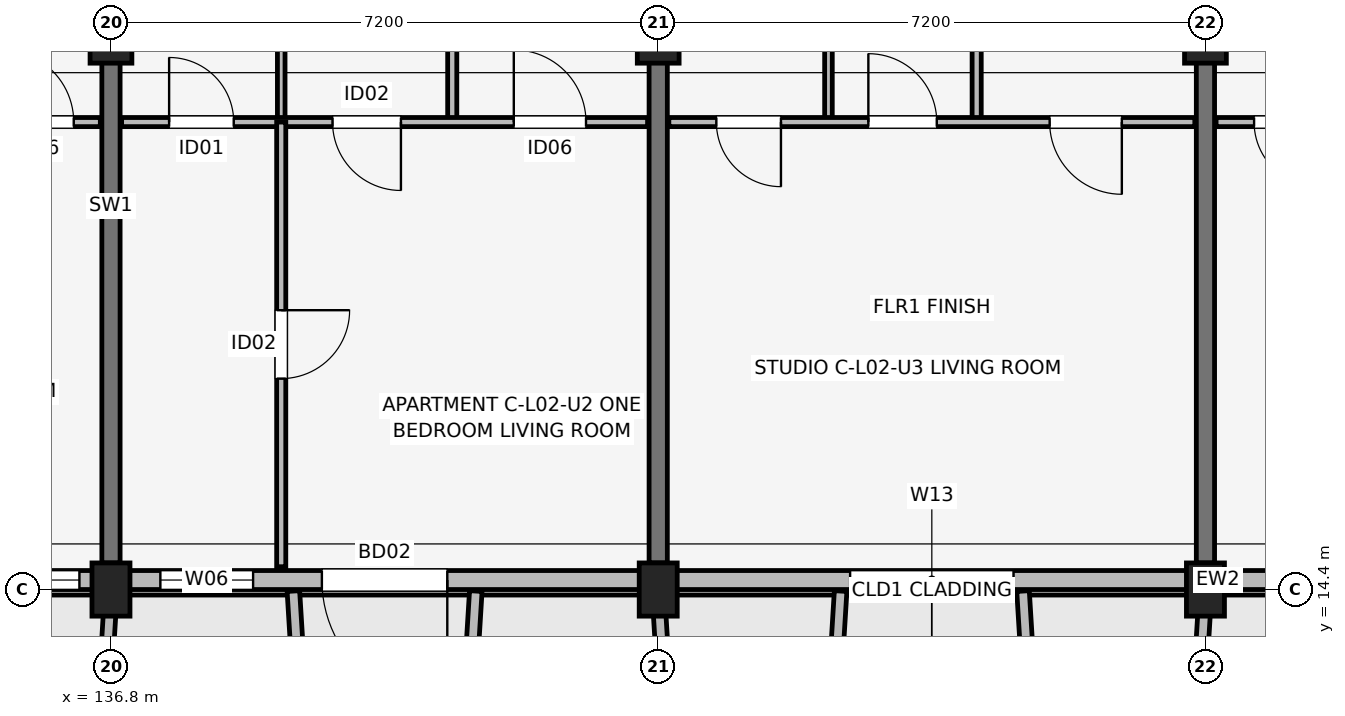
"""IFC4 building model, lengths in metres.
Left out: names, types, materials, properties, quantities, classifications, styles, units other than length and angle.
Written with IfcOpenShell. Run it as: python <this file> out.ifc"""

import sys

from ifc_helpers import new_model, si_unit, direction, frame, frame_2d, origin, origin_2d, place, context, subcontext, project, spatial, rectangle, extrude, element, fill, save


model = new_model("IFC4")
c1 = context("Model", 3, precision=1e-05, world=origin(), true_north=direction((0.0, 1.0)))
c2 = subcontext(c1, "Body", "Model", "MODEL_VIEW")
j1 = project(units=[si_unit("LENGTHUNIT", "METRE"), si_unit("PLANEANGLEUNIT", "RADIAN")], contexts=[c1])
p1 = place(None, origin())
s1 = spatial("IfcSite", under=j1, at=p1, CompositionType="ELEMENT")
p2 = place(p1, origin())
s2 = spatial("IfcBuilding", under=s1, at=p2, CompositionType="ELEMENT")
p3 = place(p2, frame((0.0, 0.0, 8.7)))
s3 = spatial("IfcBuildingStorey", under=s2, at=p3, CompositionType="ELEMENT", Elevation=8.7)
p4 = place(p3, frame((136.8, 14.4, 0.0), z_axis=(0.0, 0.0, 1.0), x_axis=(1.0, 0.0, 0.0)))
e1 = element("IfcColumn", 1, at=p4, inside=s3, PredefinedType="COLUMN", context=c2, shape_type="SweptSolid", body=[
    extrude(rectangle(XDim=0.5, YDim=0.7, at=origin_2d()), origin(), (0.0, 0.0, 1.0), 3.15),
])
p5 = place(p3, frame((136.8, 21.6, 0.0), z_axis=(0.0, 0.0, 1.0), x_axis=(1.0, 0.0, 0.0)))
e2 = element("IfcColumn", 2, at=p5, inside=s3, PredefinedType="COLUMN", context=c2, shape_type="SweptSolid", body=[
    extrude(rectangle(XDim=0.55, YDim=0.55, at=origin_2d()), origin(), (0.0, 0.0, 1.0), 3.15),
])
p6 = place(p3, frame((144.0, 14.4, 0.0), z_axis=(0.0, 0.0, 1.0), x_axis=(1.0, 0.0, 0.0)))
e3 = element("IfcColumn", 3, at=p6, inside=s3, PredefinedType="COLUMN", context=c2, shape_type="SweptSolid", body=[
    extrude(rectangle(XDim=0.5, YDim=0.7, at=origin_2d()), origin(), (0.0, 0.0, 1.0), 3.15),
])
p7 = place(p3, frame((144.0, 21.6, 0.0), z_axis=(0.0, 0.0, 1.0), x_axis=(1.0, 0.0, 0.0)))
e4 = element("IfcColumn", 4, at=p7, inside=s3, PredefinedType="COLUMN", context=c2, shape_type="SweptSolid", body=[
    extrude(rectangle(XDim=0.55, YDim=0.55, at=origin_2d()), origin(), (0.0, 0.0, 1.0), 3.15),
])
p8 = place(p3, frame((151.2, 14.4, 0.0), z_axis=(0.0, 0.0, 1.0), x_axis=(1.0, 0.0, 0.0)))
e5 = element("IfcColumn", 5, at=p8, inside=s3, PredefinedType="COLUMN", context=c2, shape_type="SweptSolid", body=[
    extrude(rectangle(XDim=0.5, YDim=0.7, at=origin_2d()), origin(), (0.0, 0.0, 1.0), 3.15),
])
p9 = place(p3, frame((151.2, 21.6, 0.0), z_axis=(0.0, 0.0, 1.0), x_axis=(1.0, 0.0, 0.0)))
e6 = element("IfcColumn", 6, at=p9, inside=s3, PredefinedType="COLUMN", context=c2, shape_type="SweptSolid", body=[
    extrude(rectangle(XDim=0.55, YDim=0.55, at=origin_2d()), origin(), (0.0, 0.0, 1.0), 3.15),
])
for number, where, z_axis, x_axis in (
    (7, (136.8, 14.75, 0.0), (0.0, 0.0, 1.0), (0.0, 1.0, 0.0)),
    (8, (144.0, 14.75, 0.0), (0.0, 0.0, 1.0), (0.0, 1.0, 0.0)),
    (9, (151.2, 14.75, 0.0), (0.0, 0.0, 1.0), (0.0, 1.0, 0.0)),
):
    element("IfcWall", number, at=place(p3, frame(where, z_axis=z_axis, x_axis=x_axis)), inside=s3, PredefinedType="SHEAR", context=c2, shape_type="SweptSolid", body=[
        extrude(rectangle(XDim=9.4, YDim=0.24, at=frame_2d((4.7, 0.0))), origin(), (0.0, 0.0, 1.0), 3.15),
    ])
p10 = place(p3, frame((132.6, 14.525, 0.0), z_axis=(0.0, 0.0, 1.0), x_axis=(1.0, 0.0, 0.0)))
e10 = element("IfcWall", 10, at=p10, inside=s3, PredefinedType="SOLIDWALL", context=c2, shape_type="SweptSolid", body=[
    extrude(rectangle(XDim=30.0, YDim=0.25, at=frame_2d((15.0, 0.0))), origin(), (0.0, 0.0, 1.0), 2.43),
])
p11 = place(p10, frame((8.625, 0.0, 0.0), z_axis=(0.0, 0.0, 1.0), x_axis=(-1.0, 0.0, 0.0)))
e11 = element("IfcOpeningElement", 11, at=p11, cuts=e10, PredefinedType="OPENING", context=c2, shape_type="SweptSolid", body=[
    extrude(rectangle(XDim=1.65, YDim=2.15, at=frame_2d((0.825, 1.075))), frame((0.0, 0.135, 0.0), z_axis=(0.0, -1.0, 0.0), x_axis=(1.0, 0.0, 0.0)), (0.0, 0.0, 1.0), 0.27),
])
p12 = place(p10, frame((22.95, 0.0, 0.0), z_axis=(0.0, 0.0, 1.0), x_axis=(-1.0, 0.0, 0.0)))
e12 = element("IfcOpeningElement", 12, at=p12, cuts=e10, PredefinedType="OPENING", context=c2, shape_type="SweptSolid", body=[
    extrude(rectangle(XDim=1.5, YDim=2.15, at=frame_2d((0.75, 1.075))), frame((0.0, 0.135, 0.0), z_axis=(0.0, -1.0, 0.0), x_axis=(1.0, 0.0, 0.0)), (0.0, 0.0, 1.0), 0.27),
])
p13 = place(p10, frame((1.925, 0.0, 0.7)))
e13 = element("IfcOpeningElement", 13, at=p13, cuts=e10, PredefinedType="OPENING", context=c2, shape_type="SweptSolid", body=[
    extrude(rectangle(XDim=1.86, YDim=1.6, at=frame_2d((0.93, 0.8))), frame((0.0, 0.135, 0.0), z_axis=(0.0, -1.0, 0.0), x_axis=(1.0, 0.0, 0.0)), (0.0, 0.0, 1.0), 0.27),
])
p14 = place(p10, frame((4.85, 0.0, 0.75)))
e14 = element("IfcOpeningElement", 14, at=p14, cuts=e10, PredefinedType="OPENING", context=c2, shape_type="SweptSolid", body=[
    extrude(rectangle(XDim=1.22, YDim=1.5, at=frame_2d((0.61, 0.75))), frame((0.0, 0.135, 0.0), z_axis=(0.0, -1.0, 0.0), x_axis=(1.0, 0.0, 0.0)), (0.0, 0.0, 1.0), 0.27),
])
p15 = place(p10, frame((13.925, 0.0, 0.67)))
e15 = element("IfcOpeningElement", 15, at=p15, cuts=e10, PredefinedType="OPENING", context=c2, shape_type="SweptSolid", body=[
    extrude(rectangle(XDim=2.15, YDim=1.65, at=frame_2d((1.075, 0.825))), frame((0.0, 0.135, 0.0), z_axis=(0.0, -1.0, 0.0), x_axis=(1.0, 0.0, 0.0)), (0.0, 0.0, 1.0), 0.27),
])
p16 = place(p10, frame((26.265, 0.0, 0.75)))
e16 = element("IfcOpeningElement", 16, at=p16, cuts=e10, PredefinedType="OPENING", context=c2, shape_type="SweptSolid", body=[
    extrude(rectangle(XDim=1.34, YDim=1.55, at=frame_2d((0.67, 0.775))), frame((0.0, 0.135, 0.0), z_axis=(0.0, -1.0, 0.0), x_axis=(1.0, 0.0, 0.0)), (0.0, 0.0, 1.0), 0.27),
])
p17 = place(p10, frame((28.715, 0.0, 0.75)))
e17 = element("IfcOpeningElement", 17, at=p17, cuts=e10, PredefinedType="OPENING", context=c2, shape_type="SweptSolid", body=[
    extrude(rectangle(XDim=0.6, YDim=1.25, at=frame_2d((0.3, 0.625))), frame((0.0, 0.135, 0.0), z_axis=(0.0, -1.0, 0.0), x_axis=(1.0, 0.0, 0.0)), (0.0, 0.0, 1.0), 0.27),
])
p18 = place(p3, frame((136.8, 14.38, 0.0), z_axis=(0.0, 0.0, 1.0), x_axis=(-0.061170732449, -0.998127317276, 0.0)))
e18 = element("IfcWall", 18, at=p18, inside=s3, PredefinedType="ELEMENTEDWALL", context=c2, shape_type="SweptSolid", body=[
    extrude(rectangle(XDim=1.964, YDim=0.165, at=frame_2d((0.982, 0.0))), origin(), (0.0, 0.0, 1.0), 2.95),
])
for number, where, z_axis, x_axis in (
    (19, (139.2, 14.38, 0.0), (0.0, 0.0, 1.0), (0.061, -0.998, 0.0)),
    (20, (141.6, 14.38, 0.0), (0.0, 0.0, 1.0), (-0.061, -0.998, 0.0)),
):
    element("IfcWall", number, at=place(p3, frame(where, z_axis=z_axis, x_axis=x_axis)), inside=s3, PredefinedType="ELEMENTEDWALL", context=c2, shape_type="SweptSolid", body=[
        extrude(rectangle(XDim=1.964, YDim=0.165, at=frame_2d((0.982, 0.0))), origin(), (0.0, 0.0, 1.0), 2.53),
    ])
p19 = place(p3, frame((144.0, 14.38, 0.0), z_axis=(0.0, 0.0, 1.0), x_axis=(0.061170732449, -0.998127317276, 0.0)))
e21 = element("IfcWall", 21, at=p19, inside=s3, PredefinedType="ELEMENTEDWALL", context=c2, shape_type="SweptSolid", body=[
    extrude(rectangle(XDim=1.964, YDim=0.165, at=frame_2d((0.982, 0.0))), origin(), (0.0, 0.0, 1.0), 2.95),
])
for number, where, z_axis, x_axis in (
    (22, (146.4, 14.38, 0.0), (0.0, 0.0, 1.0), (-0.061, -0.998, 0.0)),
    (23, (148.8, 14.38, 0.0), (0.0, 0.0, 1.0), (0.061, -0.998, 0.0)),
):
    element("IfcWall", number, at=place(p3, frame(where, z_axis=z_axis, x_axis=x_axis)), inside=s3, PredefinedType="ELEMENTEDWALL", context=c2, shape_type="SweptSolid", body=[
        extrude(rectangle(XDim=1.964, YDim=0.165, at=frame_2d((0.982, 0.0))), origin(), (0.0, 0.0, 1.0), 2.53),
    ])
p20 = place(p3, frame((151.2, 14.38, 0.0), z_axis=(0.0, 0.0, 1.0), x_axis=(-0.061046865508, -0.998134900808, 0.0)))
e24 = element("IfcWall", 24, at=p20, inside=s3, PredefinedType="ELEMENTEDWALL", context=c2, shape_type="SweptSolid", body=[
    extrude(rectangle(XDim=1.964, YDim=0.165, at=frame_2d((0.982, 0.0))), origin(), (0.0, 0.0, 1.0), 2.95),
])
p21 = place(p3, frame((129.74, 20.55, 0.0), z_axis=(0.0, 0.0, 1.0), x_axis=(1.0, 0.0, 0.0)))
e25 = element("IfcWall", 25, at=p21, inside=s3, PredefinedType="PARTITIONING", context=c2, shape_type="SweptSolid", body=[
    extrude(rectangle(XDim=6.92, YDim=0.12, at=frame_2d((3.46, 0.0))), origin(), (0.0, 0.0, 1.0), 2.38),
])
p22 = place(p21, frame((2.24, 0.0, 0.0)))
e26 = element("IfcOpeningElement", 26, at=p22, cuts=e25, PredefinedType="OPENING", context=c2, shape_type="SweptSolid", body=[
    extrude(rectangle(XDim=0.85, YDim=2.08, at=frame_2d((0.425, 1.04))), frame((0.0, 0.07, 0.0), z_axis=(0.0, -1.0, 0.0), x_axis=(1.0, 0.0, 0.0)), (0.0, 0.0, 1.0), 0.14),
])
p23 = place(p21, frame((4.895, 0.0, 0.0), z_axis=(0.0, 0.0, 1.0), x_axis=(-1.0, 0.0, 0.0)))
e27 = element("IfcOpeningElement", 27, at=p23, cuts=e25, PredefinedType="OPENING", context=c2, shape_type="SweptSolid", body=[
    extrude(rectangle(XDim=0.9, YDim=2.08, at=frame_2d((0.45, 1.04))), frame((0.0, 0.07, 0.0), z_axis=(0.0, -1.0, 0.0), x_axis=(1.0, 0.0, 0.0)), (0.0, 0.0, 1.0), 0.14),
])
p24 = place(p21, frame((5.62, 0.0, 0.0)))
e28 = element("IfcOpeningElement", 28, at=p24, cuts=e25, PredefinedType="OPENING", context=c2, shape_type="SweptSolid", body=[
    extrude(rectangle(XDim=0.95, YDim=2.08, at=frame_2d((0.475, 1.04))), frame((0.0, 0.07, 0.0), z_axis=(0.0, -1.0, 0.0), x_axis=(1.0, 0.0, 0.0)), (0.0, 0.0, 1.0), 0.14),
])
p25 = place(p3, frame((139.04, 20.55, 0.0), z_axis=(0.0, 0.0, 1.0), x_axis=(0.0, 1.0, 0.0)))
e29 = element("IfcWall", 29, at=p25, inside=s3, PredefinedType="PARTITIONING", context=c2, shape_type="SweptSolid", body=[
    extrude(rectangle(XDim=3.75, YDim=0.1, at=frame_2d((1.875, 0.0))), origin(), (0.0, 0.0, 1.0), 2.375),
])
p26 = place(p3, frame((141.29, 20.55, 0.0), z_axis=(0.0, 0.0, 1.0), x_axis=(0.0, 1.0, 0.0)))
e30 = element("IfcWall", 30, at=p26, inside=s3, PredefinedType="PARTITIONING", context=c2, shape_type="SweptSolid", body=[
    extrude(rectangle(XDim=3.75, YDim=0.12, at=frame_2d((1.875, 0.0))), origin(), (0.0, 0.0, 1.0), 2.375),
])
p27 = place(p3, frame((136.94, 20.55, 0.0), z_axis=(0.0, 0.0, 1.0), x_axis=(1.0, 0.0, 0.0)))
e31 = element("IfcWall", 31, at=p27, inside=s3, PredefinedType="PARTITIONING", context=c2, shape_type="SweptSolid", body=[
    extrude(rectangle(XDim=6.92, YDim=0.12, at=frame_2d((3.46, 0.0))), origin(), (0.0, 0.0, 1.0), 2.38),
])
p28 = place(p27, frame((0.625, 0.0, 0.0)))
e32 = element("IfcOpeningElement", 32, at=p28, cuts=e31, PredefinedType="OPENING", context=c2, shape_type="SweptSolid", body=[
    extrude(rectangle(XDim=0.85, YDim=2.08, at=frame_2d((0.425, 1.04))), frame((0.0, 0.07, 0.0), z_axis=(0.0, -1.0, 0.0), x_axis=(1.0, 0.0, 0.0)), (0.0, 0.0, 1.0), 0.14),
])
p29 = place(p27, frame((3.675, 0.0, 0.0), z_axis=(0.0, 0.0, 1.0), x_axis=(-1.0, 0.0, 0.0)))
e33 = element("IfcOpeningElement", 33, at=p29, cuts=e31, PredefinedType="OPENING", context=c2, shape_type="SweptSolid", body=[
    extrude(rectangle(XDim=0.9, YDim=2.08, at=frame_2d((0.45, 1.04))), frame((0.0, 0.07, 0.0), z_axis=(0.0, -1.0, 0.0), x_axis=(1.0, 0.0, 0.0)), (0.0, 0.0, 1.0), 0.14),
])
p30 = place(p27, frame((5.16, 0.0, 0.0)))
e34 = element("IfcOpeningElement", 34, at=p30, cuts=e31, PredefinedType="OPENING", context=c2, shape_type="SweptSolid", body=[
    extrude(rectangle(XDim=0.95, YDim=2.08, at=frame_2d((0.475, 1.04))), frame((0.0, 0.07, 0.0), z_axis=(0.0, -1.0, 0.0), x_axis=(1.0, 0.0, 0.0)), (0.0, 0.0, 1.0), 0.14),
])
p31 = place(p3, frame((139.04, 14.7, 0.0), z_axis=(0.0, 0.0, 1.0), x_axis=(0.0, 1.0, 0.0)))
e35 = element("IfcWall", 35, at=p31, inside=s3, PredefinedType="PARTITIONING", context=c2, shape_type="SweptSolid", body=[
    extrude(rectangle(XDim=5.85, YDim=0.12, at=frame_2d((2.925, 0.0))), origin(), (0.0, 0.0, 1.0), 2.38),
])
p32 = place(p31, frame((3.375, 0.0, 0.0), z_axis=(0.0, 0.0, 1.0), x_axis=(-1.0, 0.0, 0.0)))
e36 = element("IfcOpeningElement", 36, at=p32, cuts=e35, PredefinedType="OPENING", context=c2, shape_type="SweptSolid", body=[
    extrude(rectangle(XDim=0.9, YDim=2.08, at=frame_2d((0.45, 1.04))), frame((0.0, 0.07, 0.0), z_axis=(0.0, -1.0, 0.0), x_axis=(1.0, 0.0, 0.0)), (0.0, 0.0, 1.0), 0.14),
])
p33 = place(p3, frame((146.24, 20.55, 0.0), z_axis=(0.0, 0.0, 1.0), x_axis=(0.0, 1.0, 0.0)))
e37 = element("IfcWall", 37, at=p33, inside=s3, PredefinedType="PARTITIONING", context=c2, shape_type="SweptSolid", body=[
    extrude(rectangle(XDim=3.75, YDim=0.1, at=frame_2d((1.875, 0.0))), origin(), (0.0, 0.0, 1.0), 2.375),
])
p34 = place(p3, frame((148.19, 20.55, 0.0), z_axis=(0.0, 0.0, 1.0), x_axis=(0.0, 1.0, 0.0)))
e38 = element("IfcWall", 38, at=p34, inside=s3, PredefinedType="PARTITIONING", context=c2, shape_type="SweptSolid", body=[
    extrude(rectangle(XDim=3.75, YDim=0.12, at=frame_2d((1.875, 0.0))), origin(), (0.0, 0.0, 1.0), 2.375),
])
p35 = place(p3, frame((144.14, 20.55, 0.0), z_axis=(0.0, 0.0, 1.0), x_axis=(1.0, 0.0, 0.0)))
e39 = element("IfcWall", 39, at=p35, inside=s3, PredefinedType="PARTITIONING", context=c2, shape_type="SweptSolid", body=[
    extrude(rectangle(XDim=6.92, YDim=0.12, at=frame_2d((3.46, 0.0))), origin(), (0.0, 0.0, 1.0), 2.38),
])
p36 = place(p35, frame((1.475, 0.0, 0.0), z_axis=(0.0, 0.0, 1.0), x_axis=(-1.0, 0.0, 0.0)))
e40 = element("IfcOpeningElement", 40, at=p36, cuts=e39, PredefinedType="OPENING", context=c2, shape_type="SweptSolid", body=[
    extrude(rectangle(XDim=0.85, YDim=2.08, at=frame_2d((0.425, 1.04))), frame((0.0, 0.07, 0.0), z_axis=(0.0, -1.0, 0.0), x_axis=(1.0, 0.0, 0.0)), (0.0, 0.0, 1.0), 0.14),
])
p37 = place(p35, frame((2.625, 0.0, 0.0)))
e41 = element("IfcOpeningElement", 41, at=p37, cuts=e39, PredefinedType="OPENING", context=c2, shape_type="SweptSolid", body=[
    extrude(rectangle(XDim=0.9, YDim=2.08, at=frame_2d((0.45, 1.04))), frame((0.0, 0.07, 0.0), z_axis=(0.0, -1.0, 0.0), x_axis=(1.0, 0.0, 0.0)), (0.0, 0.0, 1.0), 0.14),
])
p38 = place(p35, frame((5.96, 0.0, 0.0), z_axis=(0.0, 0.0, 1.0), x_axis=(-1.0, 0.0, 0.0)))
e42 = element("IfcOpeningElement", 42, at=p38, cuts=e39, PredefinedType="OPENING", context=c2, shape_type="SweptSolid", body=[
    extrude(rectangle(XDim=0.95, YDim=2.08, at=frame_2d((0.475, 1.04))), frame((0.0, 0.07, 0.0), z_axis=(0.0, -1.0, 0.0), x_axis=(1.0, 0.0, 0.0)), (0.0, 0.0, 1.0), 0.14),
])
p39 = place(p3, frame((151.34, 20.55, 0.0), z_axis=(0.0, 0.0, 1.0), x_axis=(1.0, 0.0, 0.0)))
e43 = element("IfcWall", 43, at=p39, inside=s3, PredefinedType="PARTITIONING", context=c2, shape_type="SweptSolid", body=[
    extrude(rectangle(XDim=6.92, YDim=0.12, at=frame_2d((3.46, 0.0))), origin(), (0.0, 0.0, 1.0), 2.38),
])
p40 = place(p39, frame((1.35, 0.0, 0.0), z_axis=(0.0, 0.0, 1.0), x_axis=(-1.0, 0.0, 0.0)))
e44 = element("IfcOpeningElement", 44, at=p40, cuts=e43, PredefinedType="OPENING", context=c2, shape_type="SweptSolid", body=[
    extrude(rectangle(XDim=0.85, YDim=2.08, at=frame_2d((0.425, 1.04))), frame((0.0, 0.07, 0.0), z_axis=(0.0, -1.0, 0.0), x_axis=(1.0, 0.0, 0.0)), (0.0, 0.0, 1.0), 0.14),
])
p41 = place(p39, frame((2.375, 0.0, 0.0)))
e45 = element("IfcOpeningElement", 45, at=p41, cuts=e43, PredefinedType="OPENING", context=c2, shape_type="SweptSolid", body=[
    extrude(rectangle(XDim=0.9, YDim=2.08, at=frame_2d((0.45, 1.04))), frame((0.0, 0.07, 0.0), z_axis=(0.0, -1.0, 0.0), x_axis=(1.0, 0.0, 0.0)), (0.0, 0.0, 1.0), 0.14),
])
p42 = place(p39, frame((5.835, 0.0, 0.0), z_axis=(0.0, 0.0, 1.0), x_axis=(-1.0, 0.0, 0.0)))
e46 = element("IfcOpeningElement", 46, at=p42, cuts=e43, PredefinedType="OPENING", context=c2, shape_type="SweptSolid", body=[
    extrude(rectangle(XDim=0.95, YDim=2.08, at=frame_2d((0.475, 1.04))), frame((0.0, 0.07, 0.0), z_axis=(0.0, -1.0, 0.0), x_axis=(1.0, 0.0, 0.0)), (0.0, 0.0, 1.0), 0.14),
])
p43 = place(p11, origin())
e47 = element("IfcDoor", 47, at=p43, inside=s3, OperationType="SINGLE_SWING_RIGHT", PredefinedType="DOOR", context=c2, shape_type="SweptSolid", body=[
    extrude(rectangle(XDim=1.65, YDim=2.15, at=frame_2d((0.825, 1.075))), frame((0.0, 0.025, 0.0), z_axis=(0.0, -1.0, 0.0), x_axis=(1.0, 0.0, 0.0)), (0.0, 0.0, 1.0), 0.05),
])
fill(e11, e47)
p44 = place(p13, origin())
e48 = element("IfcWindow", 48, at=p44, inside=s3, PartitioningType="SINGLE_PANEL", PredefinedType="WINDOW", context=c2, shape_type="SweptSolid", body=[
    extrude(rectangle(XDim=1.86, YDim=1.6, at=frame_2d((0.93, 0.8))), frame((0.0, 0.03, 0.0), z_axis=(0.0, -1.0, 0.0), x_axis=(1.0, 0.0, 0.0)), (0.0, 0.0, 1.0), 0.06),
])
fill(e13, e48)
p45 = place(p14, origin())
e49 = element("IfcWindow", 49, at=p45, inside=s3, PartitioningType="SINGLE_PANEL", PredefinedType="WINDOW", context=c2, shape_type="SweptSolid", body=[
    extrude(rectangle(XDim=1.22, YDim=1.5, at=frame_2d((0.61, 0.75))), frame((0.0, 0.03, 0.0), z_axis=(0.0, -1.0, 0.0), x_axis=(1.0, 0.0, 0.0)), (0.0, 0.0, 1.0), 0.06),
])
fill(e14, e49)
p46 = place(p15, origin())
e50 = element("IfcWindow", 50, at=p46, inside=s3, PartitioningType="SINGLE_PANEL", PredefinedType="WINDOW", context=c2, shape_type="SweptSolid", body=[
    extrude(rectangle(XDim=2.15, YDim=1.65, at=frame_2d((1.075, 0.825))), frame((0.0, 0.03, 0.0), z_axis=(0.0, -1.0, 0.0), x_axis=(1.0, 0.0, 0.0)), (0.0, 0.0, 1.0), 0.06),
])
fill(e15, e50)
p47 = place(p24, origin())
e51 = element("IfcDoor", 51, at=p47, inside=s3, OperationType="SINGLE_SWING_LEFT", PredefinedType="DOOR", context=c2, shape_type="SweptSolid", body=[
    extrude(rectangle(XDim=0.95, YDim=2.08, at=frame_2d((0.475, 1.04))), frame((0.0, 0.025, 0.0), z_axis=(0.0, -1.0, 0.0), x_axis=(1.0, 0.0, 0.0)), (0.0, 0.0, 1.0), 0.05),
])
fill(e28, e51)
p48 = place(p28, origin())
e52 = element("IfcDoor", 52, at=p48, inside=s3, OperationType="SINGLE_SWING_LEFT", PredefinedType="DOOR", context=c2, shape_type="SweptSolid", body=[
    extrude(rectangle(XDim=0.85, YDim=2.08, at=frame_2d((0.425, 1.04))), frame((0.0, 0.025, 0.0), z_axis=(0.0, -1.0, 0.0), x_axis=(1.0, 0.0, 0.0)), (0.0, 0.0, 1.0), 0.05),
])
fill(e32, e52)
p49 = place(p29, origin())
e53 = element("IfcDoor", 53, at=p49, inside=s3, OperationType="SINGLE_SWING_RIGHT", PredefinedType="DOOR", context=c2, shape_type="SweptSolid", body=[
    extrude(rectangle(XDim=0.9, YDim=2.08, at=frame_2d((0.45, 1.04))), frame((0.0, 0.025, 0.0), z_axis=(0.0, -1.0, 0.0), x_axis=(1.0, 0.0, 0.0)), (0.0, 0.0, 1.0), 0.05),
])
fill(e33, e53)
p50 = place(p30, origin())
e54 = element("IfcDoor", 54, at=p50, inside=s3, OperationType="SINGLE_SWING_LEFT", PredefinedType="DOOR", context=c2, shape_type="SweptSolid", body=[
    extrude(rectangle(XDim=0.95, YDim=2.08, at=frame_2d((0.475, 1.04))), frame((0.0, 0.025, 0.0), z_axis=(0.0, -1.0, 0.0), x_axis=(1.0, 0.0, 0.0)), (0.0, 0.0, 1.0), 0.05),
])
fill(e34, e54)
p51 = place(p32, origin())
e55 = element("IfcDoor", 55, at=p51, inside=s3, OperationType="SINGLE_SWING_RIGHT", PredefinedType="DOOR", context=c2, shape_type="SweptSolid", body=[
    extrude(rectangle(XDim=0.9, YDim=2.08, at=frame_2d((0.45, 1.04))), frame((0.0, 0.025, 0.0), z_axis=(0.0, -1.0, 0.0), x_axis=(1.0, 0.0, 0.0)), (0.0, 0.0, 1.0), 0.05),
])
fill(e36, e55)
p52 = place(p36, origin())
e56 = element("IfcDoor", 56, at=p52, inside=s3, OperationType="SINGLE_SWING_RIGHT", PredefinedType="DOOR", context=c2, shape_type="SweptSolid", body=[
    extrude(rectangle(XDim=0.85, YDim=2.08, at=frame_2d((0.425, 1.04))), frame((0.0, 0.025, 0.0), z_axis=(0.0, -1.0, 0.0), x_axis=(1.0, 0.0, 0.0)), (0.0, 0.0, 1.0), 0.05),
])
fill(e40, e56)
p53 = place(p37, origin())
e57 = element("IfcDoor", 57, at=p53, inside=s3, OperationType="SINGLE_SWING_LEFT", PredefinedType="DOOR", context=c2, shape_type="SweptSolid", body=[
    extrude(rectangle(XDim=0.9, YDim=2.08, at=frame_2d((0.45, 1.04))), frame((0.0, 0.025, 0.0), z_axis=(0.0, -1.0, 0.0), x_axis=(1.0, 0.0, 0.0)), (0.0, 0.0, 1.0), 0.05),
])
fill(e41, e57)
p54 = place(p38, origin())
e58 = element("IfcDoor", 58, at=p54, inside=s3, OperationType="SINGLE_SWING_RIGHT", PredefinedType="DOOR", context=c2, shape_type="SweptSolid", body=[
    extrude(rectangle(XDim=0.95, YDim=2.08, at=frame_2d((0.475, 1.04))), frame((0.0, 0.025, 0.0), z_axis=(0.0, -1.0, 0.0), x_axis=(1.0, 0.0, 0.0)), (0.0, 0.0, 1.0), 0.05),
])
fill(e42, e58)
p55 = place(p40, origin())
e59 = element("IfcDoor", 59, at=p55, inside=s3, OperationType="SINGLE_SWING_RIGHT", PredefinedType="DOOR", context=c2, shape_type="SweptSolid", body=[
    extrude(rectangle(XDim=0.85, YDim=2.08, at=frame_2d((0.425, 1.04))), frame((0.0, 0.025, 0.0), z_axis=(0.0, -1.0, 0.0), x_axis=(1.0, 0.0, 0.0)), (0.0, 0.0, 1.0), 0.05),
])
fill(e44, e59)
save(model, sys.argv[1])
